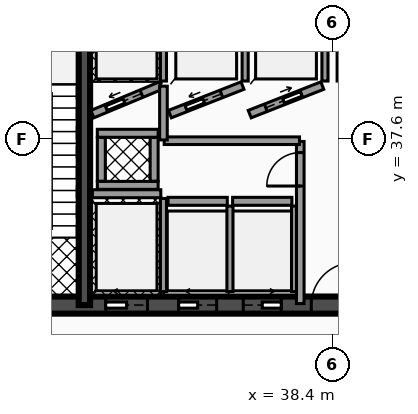
"""IFC4 building model, lengths in metres.
Left out: names, types, materials, properties, quantities, classifications, styles, units other than length and angle.
Written with IfcOpenShell. Run it as: python <this file> out.ifc"""

import sys

from ifc_helpers import new_model, si_unit, direction, frame, frame_2d, origin, place, context, subcontext, project, spatial, rectangle, extrude, element, fill, save


model = new_model("IFC4")
c1 = context("Model", 3, precision=1e-05, world=origin(), true_north=direction((0.0, 1.0)))
c2 = subcontext(c1, "Body", "Model", "MODEL_VIEW")
j1 = project(units=[si_unit("LENGTHUNIT", "METRE"), si_unit("PLANEANGLEUNIT", "RADIAN")], contexts=[c1])
p1 = place(None, origin())
s1 = spatial("IfcSite", under=j1, at=p1, CompositionType="ELEMENT")
p2 = place(p1, origin())
s2 = spatial("IfcBuilding", under=s1, at=p2, CompositionType="ELEMENT")
p3 = place(p2, origin())
s3 = spatial("IfcBuildingStorey", under=s2, at=p3, CompositionType="ELEMENT", Elevation=0.0)
p4 = place(p3, frame((28.4, 33.225, 0.0), z_axis=(0.0, 0.0, 1.0), x_axis=(1.0, 0.0, 0.0)))
e1 = element("IfcWall", 1, at=p4, inside=s3, PredefinedType="SHEAR", context=c2, shape_type="SweptSolid", body=[
    extrude(rectangle(XDim=20.11, YDim=0.45, at=frame_2d((10.055, 0.0))), origin(), (0.0, 0.0, 1.0), 4.82),
])
p5 = place(p4, frame((4.03, 0.0, 0.0)))
e2 = element("IfcOpeningElement", 2, at=p5, cuts=e1, PredefinedType="OPENING", context=c2, shape_type="SweptSolid", body=[
    extrude(rectangle(XDim=1.1, YDim=2.15, at=frame_2d((0.55, 1.075))), frame((0.0, 0.235, 0.0), z_axis=(0.0, -1.0, 0.0), x_axis=(1.0, 0.0, 0.0)), (0.0, 0.0, 1.0), 0.47),
])
p6 = place(p4, frame((14.87, 0.0, 0.0)))
e3 = element("IfcOpeningElement", 3, at=p6, cuts=e1, PredefinedType="OPENING", context=c2, shape_type="SweptSolid", body=[
    extrude(rectangle(XDim=1.1, YDim=2.15, at=frame_2d((0.55, 1.075))), frame((0.0, 0.235, 0.0), z_axis=(0.0, -1.0, 0.0), x_axis=(1.0, 0.0, 0.0)), (0.0, 0.0, 1.0), 0.47),
])
p7 = place(p4, frame((5.95, 0.0, 0.0)))
e4 = element("IfcOpeningElement", 4, at=p7, cuts=e1, PredefinedType="OPENING", context=c2, shape_type="SweptSolid", body=[
    extrude(rectangle(XDim=1.0, YDim=2.1, at=frame_2d((0.5, 1.05))), frame((0.0, 0.235, 0.0), z_axis=(0.0, -1.0, 0.0), x_axis=(1.0, 0.0, 0.0)), (0.0, 0.0, 1.0), 0.47),
])
p8 = place(p4, frame((7.65, 0.0, 0.0)))
e5 = element("IfcOpeningElement", 5, at=p8, cuts=e1, PredefinedType="OPENING", context=c2, shape_type="SweptSolid", body=[
    extrude(rectangle(XDim=1.0, YDim=2.1, at=frame_2d((0.5, 1.05))), frame((0.0, 0.235, 0.0), z_axis=(0.0, -1.0, 0.0), x_axis=(1.0, 0.0, 0.0)), (0.0, 0.0, 1.0), 0.47),
])
p9 = place(p4, frame((11.35, 0.0, 0.0)))
e6 = element("IfcOpeningElement", 6, at=p9, cuts=e1, PredefinedType="OPENING", context=c2, shape_type="SweptSolid", body=[
    extrude(rectangle(XDim=1.0, YDim=2.1, at=frame_2d((0.5, 1.05))), frame((0.0, 0.235, 0.0), z_axis=(0.0, -1.0, 0.0), x_axis=(1.0, 0.0, 0.0)), (0.0, 0.0, 1.0), 0.47),
])
p10 = place(p4, frame((13.05, 0.0, 0.0)))
e7 = element("IfcOpeningElement", 7, at=p10, cuts=e1, PredefinedType="OPENING", context=c2, shape_type="SweptSolid", body=[
    extrude(rectangle(XDim=1.0, YDim=2.1, at=frame_2d((0.5, 1.05))), frame((0.0, 0.235, 0.0), z_axis=(0.0, -1.0, 0.0), x_axis=(1.0, 0.0, 0.0)), (0.0, 0.0, 1.0), 0.47),
])
p11 = place(p4, frame((1.31, 0.0, 0.0)))
e8 = element("IfcOpeningElement", 8, at=p11, cuts=e1, PredefinedType="OPENING", context=c2, shape_type="SweptSolid", body=[
    extrude(rectangle(XDim=1.1, YDim=2.2, at=frame_2d((0.55, 1.1))), frame((0.0, 0.235, 0.0), z_axis=(0.0, -1.0, 0.0), x_axis=(1.0, 0.0, 0.0)), (0.0, 0.0, 1.0), 0.47),
])
p12 = place(p4, frame((9.44, 0.0, 0.0)))
e9 = element("IfcOpeningElement", 9, at=p12, cuts=e1, PredefinedType="OPENING", context=c2, shape_type="SweptSolid", body=[
    extrude(rectangle(XDim=1.12, YDim=2.05, at=frame_2d((0.56, 1.025))), frame((0.0, 0.235, 0.0), z_axis=(0.0, -1.0, 0.0), x_axis=(1.0, 0.0, 0.0)), (0.0, 0.0, 1.0), 0.47),
])
p13 = place(p4, frame((17.65, 0.0, 0.0)))
e10 = element("IfcOpeningElement", 10, at=p13, cuts=e1, PredefinedType="OPENING", context=c2, shape_type="SweptSolid", body=[
    extrude(rectangle(XDim=1.1, YDim=2.2, at=frame_2d((0.55, 1.1))), frame((0.0, 0.235, 0.0), z_axis=(0.0, -1.0, 0.0), x_axis=(1.0, 0.0, 0.0)), (0.0, 0.0, 1.0), 0.47),
])
p14 = place(p3, frame((31.87, 33.225, 0.0), z_axis=(0.0, 0.0, 1.0), x_axis=(0.0, 1.0, 0.0)))
e11 = element("IfcWall", 11, at=p14, inside=s3, PredefinedType="SHEAR", context=c2, shape_type="SweptSolid", body=[
    extrude(rectangle(XDim=10.25, YDim=0.3, at=frame_2d((5.125, 0.0))), origin(), (0.0, 0.0, 1.0), 4.82),
])
p15 = place(p3, frame((32.08, 36.155, 0.0), z_axis=(0.0, 0.0, 1.0), x_axis=(1.0, 0.0, 0.0)))
e12 = element("IfcWall", 12, at=p15, inside=s3, PredefinedType="SOLIDWALL", context=c2, shape_type="SweptSolid", body=[
    extrude(rectangle(XDim=1.8, YDim=0.21, at=frame_2d((0.9, 0.0))), origin(), (0.0, 0.0, 1.0), 3.792),
])
p16 = place(p3, frame((33.95, 33.58, 0.0), z_axis=(0.0, 0.0, 1.0), x_axis=(0.0, 1.0, 0.0)))
e13 = element("IfcWall", 13, at=p16, inside=s3, PredefinedType="SOLIDWALL", context=c2, shape_type="SweptSolid", body=[
    extrude(rectangle(XDim=2.45, YDim=0.16, at=frame_2d((1.225, 0.0))), origin(), (0.0, 0.0, 1.0), 3.792),
])
p17 = place(p3, frame((32.08, 38.25, 0.0), z_axis=(0.0, 0.0, 1.0), x_axis=(0.923062104416, 0.384650947472, 0.0)))
e14 = element("IfcWall", 14, at=p17, inside=s3, PredefinedType="SOLIDWALL", context=c2, shape_type="SweptSolid", body=[
    extrude(rectangle(XDim=1.95, YDim=0.21, at=frame_2d((0.975, 0.0))), origin(), (0.0, 0.0, 1.0), 3.792),
])
p18 = place(p17, frame((0.4, 0.0, 0.0)))
e15 = element("IfcOpeningElement", 15, at=p18, cuts=e14, PredefinedType="OPENING", context=c2, shape_type="SweptSolid", body=[
    extrude(rectangle(XDim=1.0, YDim=2.1, at=frame_2d((0.5, 1.05))), frame((0.0, 0.115, 0.0), z_axis=(0.0, -1.0, 0.0), x_axis=(1.0, 0.0, 0.0)), (0.0, 0.0, 1.0), 0.23),
])
p19 = place(p3, frame((33.95, 39.12, 0.0), z_axis=(0.0, 0.0, 1.0), x_axis=(0.0, 1.0, 0.0)))
e16 = element("IfcWall", 16, at=p19, inside=s3, PredefinedType="SOLIDWALL", context=c2, shape_type="SweptSolid", body=[
    extrude(rectangle(XDim=2.21, YDim=0.16, at=frame_2d((1.105, 0.0))), origin(), (0.0, 0.0, 1.0), 3.792),
])
p20 = place(p3, frame((34.12, 38.25, 0.0), z_axis=(0.0, 0.0, 1.0), x_axis=(0.930804993012, 0.36551616241, 0.0)))
e17 = element("IfcWall", 17, at=p20, inside=s3, PredefinedType="SOLIDWALL", context=c2, shape_type="SweptSolid", body=[
    extrude(rectangle(XDim=2.052, YDim=0.21, at=frame_2d((1.026, 0.0))), origin(), (0.0, 0.0, 1.0), 3.792),
])
p21 = place(p20, frame((0.455, 0.0, 0.0)))
e18 = element("IfcOpeningElement", 18, at=p21, cuts=e17, PredefinedType="OPENING", context=c2, shape_type="SweptSolid", body=[
    extrude(rectangle(XDim=1.0, YDim=2.1, at=frame_2d((0.5, 1.05))), frame((0.0, 0.115, 0.0), z_axis=(0.0, -1.0, 0.0), x_axis=(1.0, 0.0, 0.0)), (0.0, 0.0, 1.0), 0.23),
])
p22 = place(p3, frame((36.1, 39.12, 0.0), z_axis=(0.0, 0.0, 1.0), x_axis=(0.0, 1.0, 0.0)))
e19 = element("IfcWall", 19, at=p22, inside=s3, PredefinedType="SOLIDWALL", context=c2, shape_type="SweptSolid", body=[
    extrude(rectangle(XDim=2.21, YDim=0.16, at=frame_2d((1.105, 0.0))), origin(), (0.0, 0.0, 1.0), 3.792),
])
p23 = place(p3, frame((36.22, 38.25, 0.0), z_axis=(0.0, 0.0, 1.0), x_axis=(0.930804993012, 0.36551616241, 0.0)))
e20 = element("IfcWall", 20, at=p23, inside=s3, PredefinedType="SOLIDWALL", context=c2, shape_type="SweptSolid", body=[
    extrude(rectangle(XDim=2.052, YDim=0.21, at=frame_2d((1.026, 0.0))), origin(), (0.0, 0.0, 1.0), 3.792),
])
p24 = place(p23, frame((0.455, 0.0, 0.0)))
e21 = element("IfcOpeningElement", 21, at=p24, cuts=e20, PredefinedType="OPENING", context=c2, shape_type="SweptSolid", body=[
    extrude(rectangle(XDim=1.0, YDim=2.1, at=frame_2d((0.5, 1.05))), frame((0.0, 0.115, 0.0), z_axis=(0.0, -1.0, 0.0), x_axis=(1.0, 0.0, 0.0)), (0.0, 0.0, 1.0), 0.23),
])
for number, where, z_axis, x_axis in (
    (22, (38.2, 39.12, 0.0), (0.0, 0.0, 1.0), (0.0, 1.0, 0.0)),
    (23, (38.6, 39.12, 0.0), (0.0, 0.0, 1.0), (0.0, 1.0, 0.0)),
):
    element("IfcWall", number, at=place(p3, frame(where, z_axis=z_axis, x_axis=x_axis)), inside=s3, PredefinedType="SOLIDWALL", context=c2, shape_type="SweptSolid", body=[
        extrude(rectangle(XDim=2.21, YDim=0.16, at=frame_2d((1.105, 0.0))), origin(), (0.0, 0.0, 1.0), 3.792),
    ])
p25 = place(p3, frame((34.07, 35.955, 0.0), z_axis=(0.0, 0.0, 1.0), x_axis=(1.0, 0.0, 0.0)))
e24 = element("IfcWall", 24, at=p25, inside=s3, PredefinedType="SOLIDWALL", context=c2, shape_type="SweptSolid", body=[
    extrude(rectangle(XDim=1.56, YDim=0.21, at=frame_2d((0.78, 0.0))), origin(), (0.0, 0.0, 1.0), 3.792),
])
p26 = place(p3, frame((35.7, 33.58, 0.0), z_axis=(0.0, 0.0, 1.0), x_axis=(0.0, 1.0, 0.0)))
e25 = element("IfcWall", 25, at=p26, inside=s3, PredefinedType="SOLIDWALL", context=c2, shape_type="SweptSolid", body=[
    extrude(rectangle(XDim=2.25, YDim=0.16, at=frame_2d((1.125, 0.0))), origin(), (0.0, 0.0, 1.0), 3.792),
])
p27 = place(p3, frame((35.77, 35.955, 0.0), z_axis=(0.0, 0.0, 1.0), x_axis=(1.0, 0.0, 0.0)))
e26 = element("IfcWall", 26, at=p27, inside=s3, PredefinedType="SOLIDWALL", context=c2, shape_type="SweptSolid", body=[
    extrude(rectangle(XDim=1.56, YDim=0.21, at=frame_2d((0.78, 0.0))), origin(), (0.0, 0.0, 1.0), 3.792),
])
p28 = place(p3, frame((37.4, 33.58, 0.0), z_axis=(0.0, 0.0, 1.0), x_axis=(0.0, 1.0, 0.0)))
e27 = element("IfcWall", 27, at=p28, inside=s3, PredefinedType="SOLIDWALL", context=c2, shape_type="SweptSolid", body=[
    extrude(rectangle(XDim=2.25, YDim=0.16, at=frame_2d((1.125, 0.0))), origin(), (0.0, 0.0, 1.0), 3.792),
])
for number, where, z_axis, x_axis in (
    (28, (32.21, 36.375, 0.0), (0.0, 0.0, 1.0), (1.0, 0.0, 0.0)),
    (29, (32.21, 37.745, 0.0), (0.0, 0.0, 1.0), (1.0, 0.0, 0.0)),
):
    element("IfcWall", number, at=place(p3, frame(where, z_axis=z_axis, x_axis=x_axis)), inside=s3, PredefinedType="SOLIDWALL", context=c2, shape_type="SweptSolid", body=[
        extrude(rectangle(XDim=1.6, YDim=0.21, at=frame_2d((0.8, 0.0))), origin(), (0.0, 0.0, 1.0), 4.82),
    ])
for number, where, z_axis, x_axis in (
    (30, (32.315, 36.485, 0.0), (0.0, 0.0, 1.0), (0.0, 1.0, 0.0)),
    (31, (33.705, 36.485, 0.0), (0.0, 0.0, 1.0), (0.0, 1.0, 0.0)),
):
    element("IfcWall", number, at=place(p3, frame(where, z_axis=z_axis, x_axis=x_axis)), inside=s3, PredefinedType="SOLIDWALL", context=c2, shape_type="SweptSolid", body=[
        extrude(rectangle(XDim=1.15, YDim=0.21, at=frame_2d((0.575, 0.0))), origin(), (0.0, 0.0, 1.0), 4.82),
    ])
p29 = place(p3, frame((37.55, 33.265, 0.0), z_axis=(0.0, 0.0, 1.0), x_axis=(0.0, 1.0, 0.0)))
e32 = element("IfcWall", 32, at=p29, inside=s3, PredefinedType="PARTITIONING", context=c2, shape_type="SweptSolid", body=[
    extrude(rectangle(XDim=4.265, YDim=0.2, at=frame_2d((2.133, 0.0))), origin(), (0.0, 0.0, 1.0), 3.777),
])
p30 = place(p29, frame((3.093, 0.0, 0.0)))
e33 = element("IfcOpeningElement", 33, at=p30, cuts=e32, PredefinedType="OPENING", context=c2, shape_type="SweptSolid", body=[
    extrude(rectangle(XDim=0.88, YDim=2.05, at=frame_2d((0.44, 1.025))), frame((0.0, 0.11, 0.0), z_axis=(0.0, -1.0, 0.0), x_axis=(1.0, 0.0, 0.0)), (0.0, 0.0, 1.0), 0.22),
])
p31 = place(p3, frame((33.97, 37.55, 0.0), z_axis=(0.0, 0.0, 1.0), x_axis=(1.0, 0.0, 0.0)))
e34 = element("IfcWall", 34, at=p31, inside=s3, PredefinedType="PARTITIONING", context=c2, shape_type="SweptSolid", body=[
    extrude(rectangle(XDim=3.56, YDim=0.2, at=frame_2d((1.78, 0.0))), origin(), (0.0, 0.0, 1.0), 3.777),
])
p32 = place(p3, frame((33.95, 37.57, 0.0), z_axis=(0.0, 0.0, 1.0), x_axis=(0.0, 1.0, 0.0)))
e35 = element("IfcWall", 35, at=p32, inside=s3, PredefinedType="PARTITIONING", context=c2, shape_type="SweptSolid", body=[
    extrude(rectangle(XDim=1.415, YDim=0.2, at=frame_2d((0.708, 0.0))), origin(), (0.0, 0.0, 1.0), 3.777),
])
p33 = place(p5, origin())
e36 = element("IfcDoor", 36, at=p33, inside=s3, OperationType="SLIDING_TO_LEFT", PredefinedType="DOOR", context=c2, shape_type="SweptSolid", body=[
    extrude(rectangle(XDim=1.1, YDim=2.15, at=frame_2d((0.55, 1.075))), frame((0.0, 0.025, 0.0), z_axis=(0.0, -1.0, 0.0), x_axis=(1.0, 0.0, 0.0)), (0.0, 0.0, 1.0), 0.05),
])
fill(e2, e36)
p34 = place(p18, origin())
e37 = element("IfcDoor", 37, at=p34, inside=s3, OperationType="SLIDING_TO_LEFT", PredefinedType="DOOR", context=c2, shape_type="SweptSolid", body=[
    extrude(rectangle(XDim=1.0, YDim=2.1, at=frame_2d((0.5, 1.05))), frame((0.0, 0.025, 0.0), z_axis=(0.0, -1.0, 0.0), x_axis=(1.0, 0.0, 0.0)), (0.0, 0.0, 1.0), 0.05),
])
fill(e15, e37)
p35 = place(p21, origin())
e38 = element("IfcDoor", 38, at=p35, inside=s3, OperationType="SLIDING_TO_LEFT", PredefinedType="DOOR", context=c2, shape_type="SweptSolid", body=[
    extrude(rectangle(XDim=1.0, YDim=2.1, at=frame_2d((0.5, 1.05))), frame((0.0, 0.025, 0.0), z_axis=(0.0, -1.0, 0.0), x_axis=(1.0, 0.0, 0.0)), (0.0, 0.0, 1.0), 0.05),
])
fill(e18, e38)
p36 = place(p24, origin())
e39 = element("IfcDoor", 39, at=p36, inside=s3, OperationType="SLIDING_TO_RIGHT", PredefinedType="DOOR", context=c2, shape_type="SweptSolid", body=[
    extrude(rectangle(XDim=1.0, YDim=2.1, at=frame_2d((0.5, 1.05))), frame((0.0, 0.025, 0.0), z_axis=(0.0, -1.0, 0.0), x_axis=(1.0, 0.0, 0.0)), (0.0, 0.0, 1.0), 0.05),
])
fill(e21, e39)
p37 = place(p7, origin())
e40 = element("IfcDoor", 40, at=p37, inside=s3, OperationType="SLIDING_TO_LEFT", PredefinedType="DOOR", context=c2, shape_type="SweptSolid", body=[
    extrude(rectangle(XDim=1.0, YDim=2.1, at=frame_2d((0.5, 1.05))), frame((0.0, 0.025, 0.0), z_axis=(0.0, -1.0, 0.0), x_axis=(1.0, 0.0, 0.0)), (0.0, 0.0, 1.0), 0.05),
])
fill(e4, e40)
p38 = place(p8, origin())
e41 = element("IfcDoor", 41, at=p38, inside=s3, OperationType="SLIDING_TO_RIGHT", PredefinedType="DOOR", context=c2, shape_type="SweptSolid", body=[
    extrude(rectangle(XDim=1.0, YDim=2.1, at=frame_2d((0.5, 1.05))), frame((0.0, 0.025, 0.0), z_axis=(0.0, -1.0, 0.0), x_axis=(1.0, 0.0, 0.0)), (0.0, 0.0, 1.0), 0.05),
])
fill(e5, e41)
p39 = place(p12, origin())
e42 = element("IfcDoor", 42, at=p39, inside=s3, OperationType="SINGLE_SWING_RIGHT", PredefinedType="DOOR", context=c2, shape_type="SweptSolid", body=[
    extrude(rectangle(XDim=1.12, YDim=2.05, at=frame_2d((0.56, 1.025))), frame((0.0, 0.025, 0.0), z_axis=(0.0, -1.0, 0.0), x_axis=(1.0, 0.0, 0.0)), (0.0, 0.0, 1.0), 0.05),
])
fill(e9, e42)
p40 = place(p30, origin())
e43 = element("IfcDoor", 43, at=p40, inside=s3, OperationType="SINGLE_SWING_LEFT", PredefinedType="DOOR", context=c2, shape_type="SweptSolid", body=[
    extrude(rectangle(XDim=0.88, YDim=2.05, at=frame_2d((0.44, 1.025))), frame((0.0, 0.025, 0.0), z_axis=(0.0, -1.0, 0.0), x_axis=(1.0, 0.0, 0.0)), (0.0, 0.0, 1.0), 0.05),
])
fill(e33, e43)
save(model, sys.argv[1])
